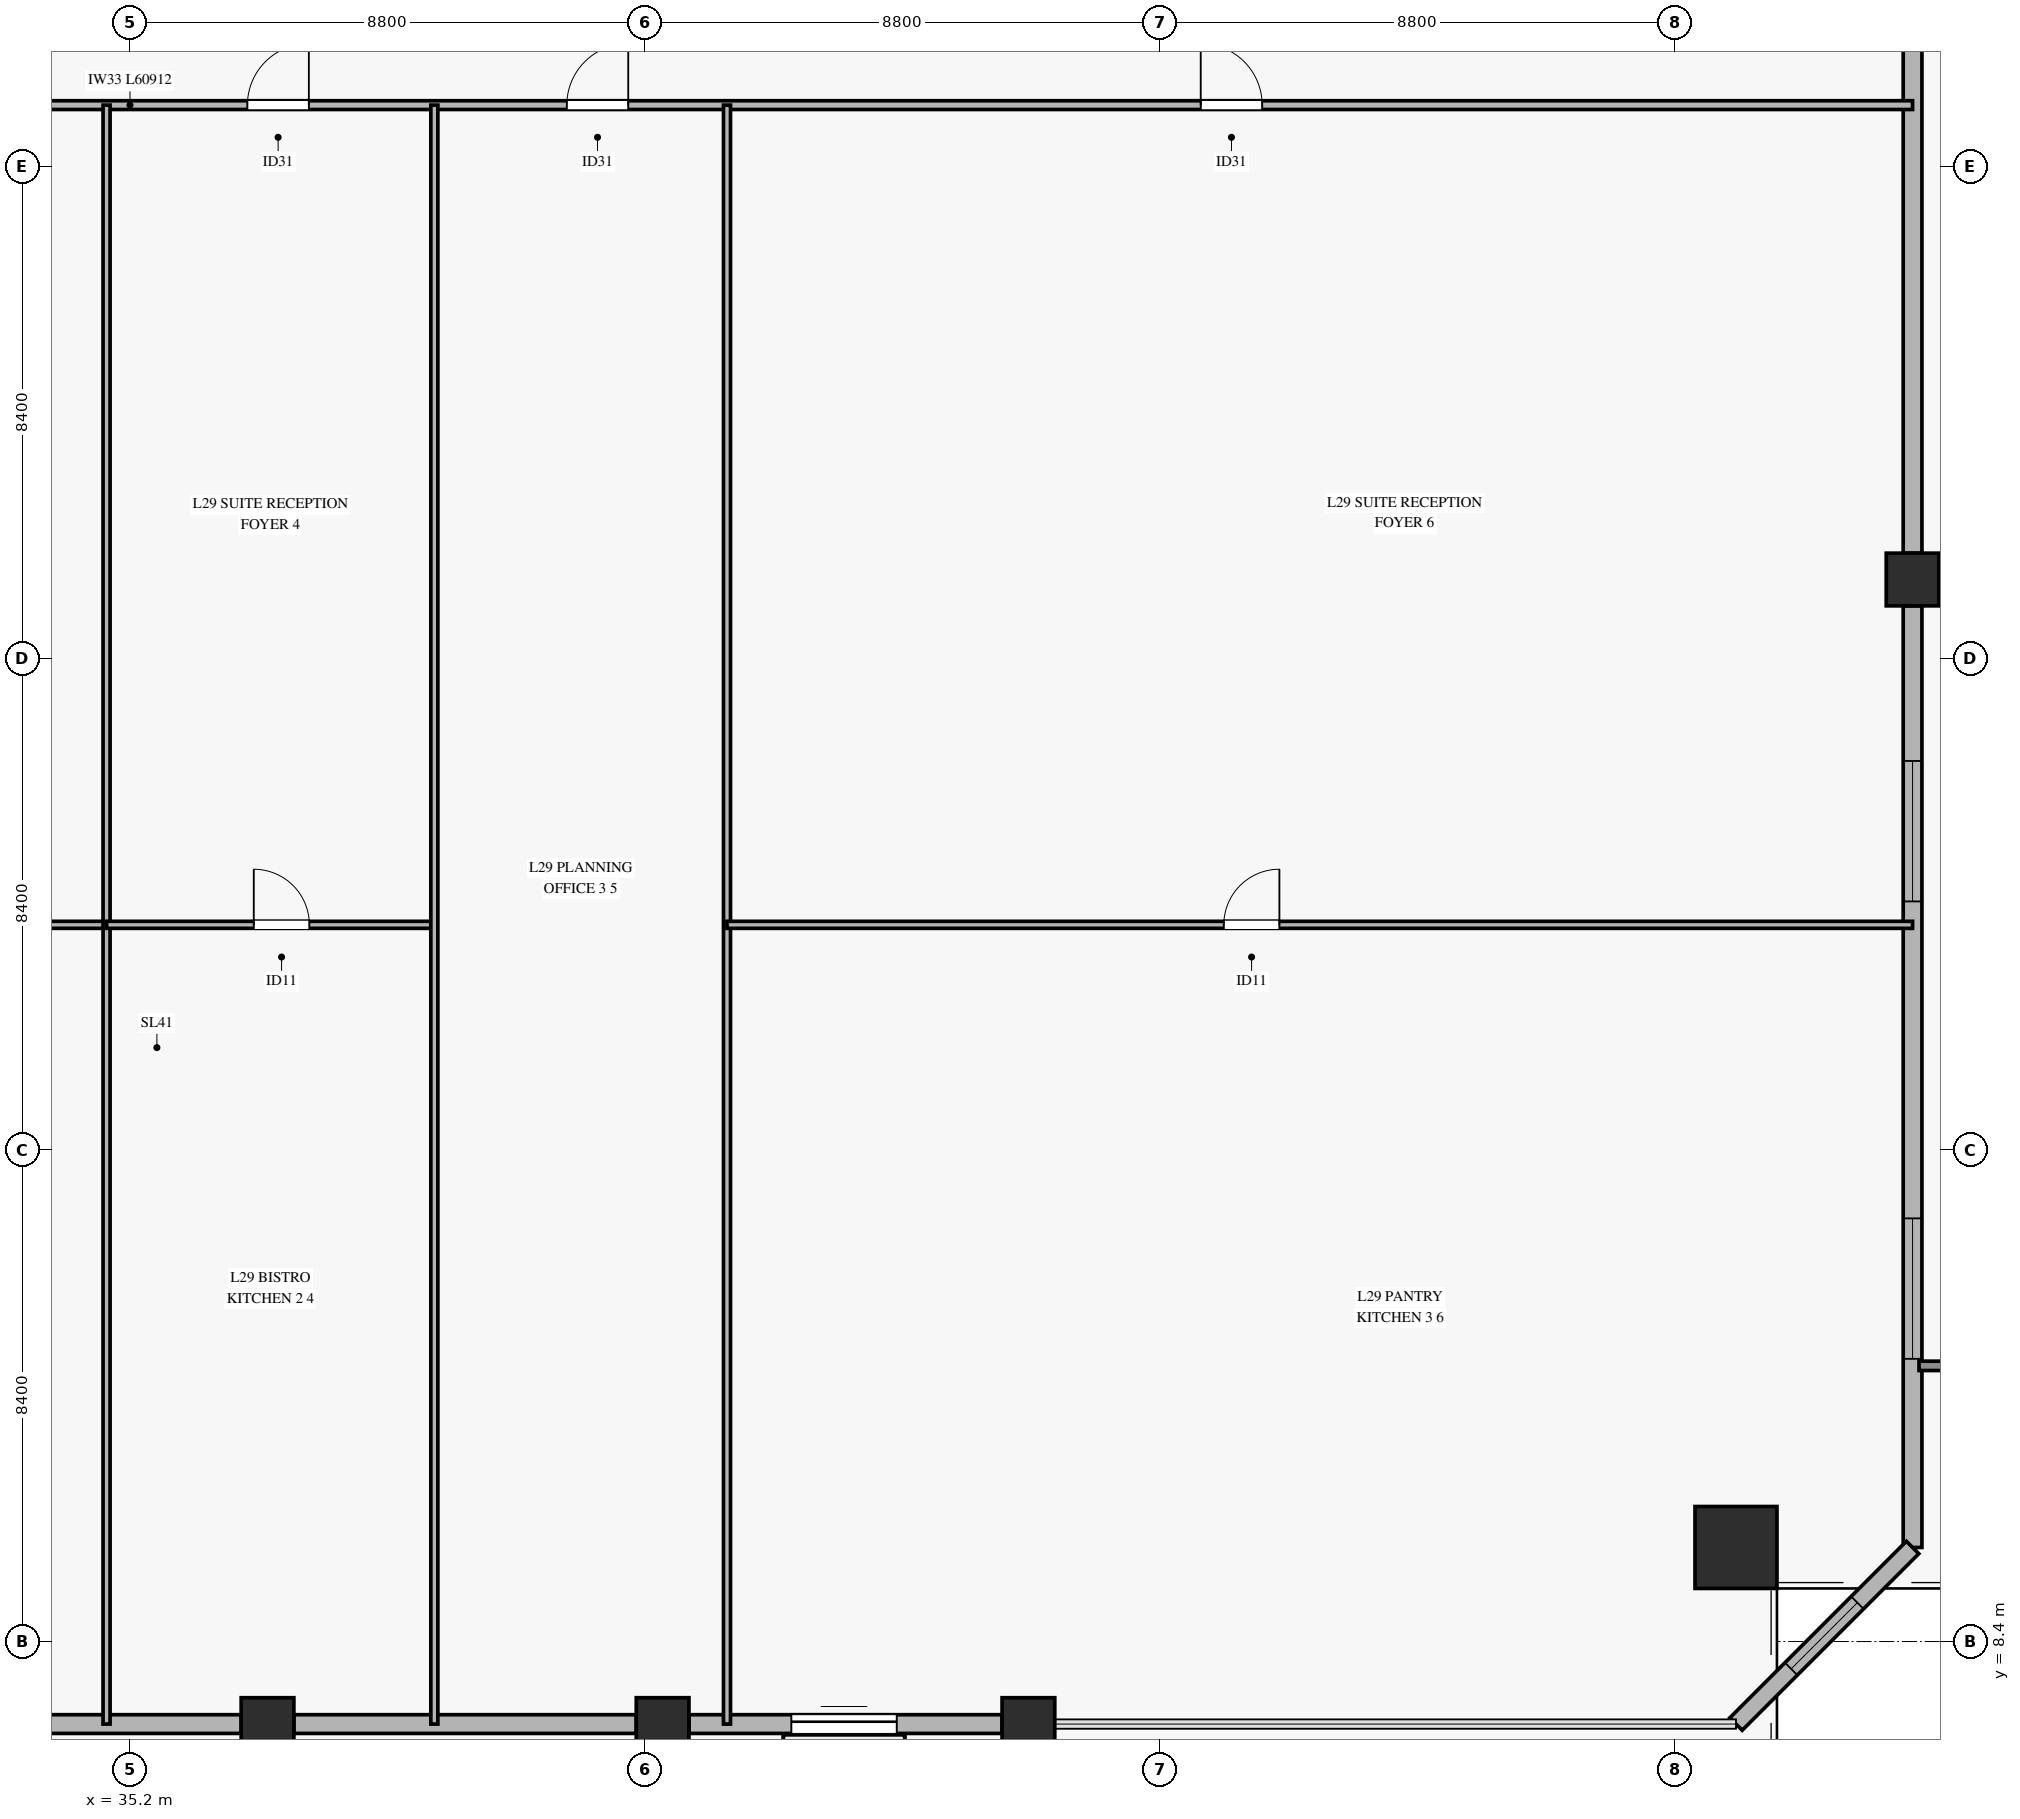
"""IFC4 building model, lengths in metres.
Left out: names, types, materials, properties, quantities, classifications, styles, units other than length and angle.
Written with IfcOpenShell. Run it as: python <this file> out.ifc"""

import sys

from ifc_helpers import new_model, si_unit, direction, frame, frame_2d, origin, origin_2d, place, context, subcontext, project, spatial, rectangle, hollow_rectangle, extrude, source, transform, mapped, element, fill, save


model = new_model("IFC4")
c1 = context("Model", 3, precision=1e-05, world=origin(), true_north=direction((0.0, 1.0)))
c2 = subcontext(c1, "Body", "Model", "MODEL_VIEW")
j1 = project(units=[si_unit("LENGTHUNIT", "METRE"), si_unit("PLANEANGLEUNIT", "RADIAN")], contexts=[c1])
p1 = place(None, origin())
s1 = spatial("IfcSite", under=j1, at=p1, CompositionType="ELEMENT")
p2 = place(p1, origin())
s2 = spatial("IfcBuilding", under=s1, at=p2, CompositionType="ELEMENT")
p3 = place(p2, frame((0.0, 0.0, 119.2)))
s3 = spatial("IfcBuildingStorey", under=s2, at=p3, CompositionType="ELEMENT", Elevation=119.2)
m1 = source(origin(), c2, "Body", "SweptSolid", [
    extrude(hollow_rectangle(XDim=1.4, YDim=1.4, WallThickness=0.065, at=origin_2d()), origin(), (0.0, 0.0, 1.0), 3.72),
])
p4 = place(p3, frame((62.639, 10.007, 0.0), z_axis=(-0.056180364921, 0.134937885839, 0.989260093991), x_axis=(-0.923183164535, -0.384360305857, 0.0)))
e1 = element("IfcColumn", 1, at=p4, inside=s3, PredefinedType="COLUMN", context=c2, shape_type="MappedRepresentation", body=[
    mapped(m1, transform((0.0, 0.0, 0.0), x_axis=(1.0, 0.0, 0.0), y_axis=(0.0, 1.0, 0.0), z_axis=(0.0, 0.0, 1.0), scale=1.0)),
])
m2 = source(origin(), c2, "Body", "SweptSolid", [
    extrude(hollow_rectangle(XDim=0.9, YDim=0.9, WallThickness=0.04, at=origin_2d()), origin(), (0.0, 0.0, 1.0), 3.718),
])
for number, where, z_axis, x_axis in (
    (2, (37.55, 6.99, 0.0), (0.0, 0.142, 0.99), (-1.0, 0.0, 0.0)),
    (3, (44.3, 6.99, 0.0), (0.0, 0.142, 0.99), (-1.0, 0.0, 0.0)),
    (4, (50.55, 6.99, 0.0), (0.0, 0.142, 0.99), (-1.0, 0.0, 0.0)),
):
    element("IfcColumn", number, at=place(p3, frame(where, z_axis=z_axis, x_axis=x_axis)), inside=s3, PredefinedType="COLUMN", context=c2, shape_type="MappedRepresentation", body=[
        mapped(m2, transform((0.0, 0.0, 0.0), x_axis=(1.0, 0.0, 0.0), y_axis=(0.0, 1.0, 0.0), z_axis=(0.0, 0.0, 1.0), scale=1.0)),
    ])
m3 = source(origin(), c2, "Body", "SweptSolid", [
    extrude(hollow_rectangle(XDim=0.9, YDim=0.9, WallThickness=0.04, at=origin_2d()), origin(), (0.0, 0.0, 1.0), 3.697),
])
p5 = place(p3, frame((65.656, 26.545, 0.0), z_axis=(-0.063596100828, 0.07145480903, 0.995414359062), x_axis=(-0.746990181356, -0.664835068989, 0.0)))
e5 = element("IfcColumn", 5, at=p5, inside=s3, PredefinedType="COLUMN", context=c2, shape_type="MappedRepresentation", body=[
    mapped(m3, transform((0.0, 0.0, 0.0), x_axis=(1.0, 0.0, 0.0), y_axis=(0.0, 1.0, 0.0), z_axis=(0.0, 0.0, 1.0), scale=1.0)),
])
for number, where, z_axis, x_axis in (
    (6, (31.25, 6.99, 0.0), (0.0, 0.0, 1.0), (1.0, 0.0, 0.0)),
    (7, (38.0, 6.99, 0.0), (0.0, 0.0, 1.0), (1.0, 0.0, 0.0)),
):
    element("IfcWall", number, at=place(p3, frame(where, z_axis=z_axis, x_axis=x_axis)), inside=s3, PredefinedType="SOLIDWALL", context=c2, shape_type="SweptSolid", body=[
        extrude(rectangle(XDim=5.85, YDim=0.32, at=frame_2d((2.925, 0.0))), origin(), (0.0, 0.0, 1.0), 3.16),
    ])
p6 = place(p3, frame((44.75, 6.99, 0.0), z_axis=(0.0, 0.0, 1.0), x_axis=(1.0, 0.0, 0.0)))
e8 = element("IfcWall", 8, at=p6, inside=s3, PredefinedType="SOLIDWALL", context=c2, shape_type="SweptSolid", body=[
    extrude(rectangle(XDim=5.35, YDim=0.32, at=frame_2d((2.675, 0.0))), origin(), (0.0, 0.0, 1.0), 3.16),
])
p7 = place(p6, frame((1.75, 0.0, 0.0)))
e9 = element("IfcOpeningElement", 9, at=p7, cuts=e8, PredefinedType="OPENING", context=c2, shape_type="SweptSolid", body=[
    extrude(rectangle(XDim=1.8, YDim=2.25, at=frame_2d((0.9, 1.125))), frame((0.0, 0.17, 0.0), z_axis=(0.0, -1.0, 0.0), x_axis=(1.0, 0.0, 0.0)), (0.0, 0.0, 1.0), 0.34),
])
p8 = place(p3, frame((65.656, 10.007, 0.0), z_axis=(0.0, 0.0, 1.0), x_axis=(0.0, 1.0, 0.0)))
e10 = element("IfcWall", 10, at=p8, inside=s3, PredefinedType="SOLIDWALL", context=c2, shape_type="SweptSolid", body=[
    extrude(rectangle(XDim=16.088, YDim=0.32, at=frame_2d((8.044, 0.0))), origin(), (0.0, 0.0, 1.0), 3.16),
])
p9 = place(p8, frame((3.223, 0.0, 0.45)))
e11 = element("IfcOpeningElement", 11, at=p9, cuts=e10, PredefinedType="OPENING", context=c2, shape_type="SweptSolid", body=[
    extrude(rectangle(XDim=2.4, YDim=2.1, at=frame_2d((1.2, 1.05))), frame((0.0, 0.17, 0.0), z_axis=(0.0, -1.0, 0.0), x_axis=(1.0, 0.0, 0.0)), (0.0, 0.0, 1.0), 0.34),
])
p10 = place(p8, frame((11.038, 0.0, 0.45)))
e12 = element("IfcOpeningElement", 12, at=p10, cuts=e10, PredefinedType="OPENING", context=c2, shape_type="SweptSolid", body=[
    extrude(rectangle(XDim=2.4, YDim=2.1, at=frame_2d((1.2, 1.05))), frame((0.0, 0.17, 0.0), z_axis=(0.0, -1.0, 0.0), x_axis=(1.0, 0.0, 0.0)), (0.0, 0.0, 1.0), 0.34),
])
p11 = place(p3, frame((65.656, 26.995, 0.0), z_axis=(0.0, 0.0, 1.0), x_axis=(0.0, 1.0, 0.0)))
e13 = element("IfcWall", 13, at=p11, inside=s3, PredefinedType="SOLIDWALL", context=c2, shape_type="SweptSolid", body=[
    extrude(rectangle(XDim=16.088, YDim=0.32, at=frame_2d((8.044, 0.0))), origin(), (0.0, 0.0, 1.0), 3.16),
])
p12 = place(p11, frame((10.86, 0.0, 0.45)))
e14 = element("IfcOpeningElement", 14, at=p12, cuts=e13, PredefinedType="OPENING", context=c2, shape_type="SweptSolid", body=[
    extrude(rectangle(XDim=2.4, YDim=2.1, at=frame_2d((1.2, 1.05))), frame((0.0, 0.17, 0.0), z_axis=(0.0, -1.0, 0.0), x_axis=(1.0, 0.0, 0.0)), (0.0, 0.0, 1.0), 0.34),
])
p13 = place(p3, frame((62.639, 6.99, 0.0), z_axis=(0.0, 0.0, 1.0), x_axis=(0.707106781187, 0.707106781187, 0.0)))
e15 = element("IfcWall", 15, at=p13, inside=s3, PredefinedType="SOLIDWALL", context=c2, shape_type="SweptSolid", body=[
    extrude(rectangle(XDim=4.267, YDim=0.3, at=frame_2d((2.133, 0.0))), origin(), (0.0, 0.0, 1.0), 3.16),
])
p14 = place(p13, frame((1.333, 0.0, 0.45)))
e16 = element("IfcOpeningElement", 16, at=p14, cuts=e15, PredefinedType="OPENING", context=c2, shape_type="SweptSolid", body=[
    extrude(rectangle(XDim=1.6, YDim=2.0, at=frame_2d((0.8, 1.0))), frame((0.0, 0.16, 0.0), z_axis=(0.0, -1.0, 0.0), x_axis=(1.0, 0.0, 0.0)), (0.0, 0.0, 1.0), 0.32),
])
p15 = place(p3, frame((4.744, 34.65, 0.0), z_axis=(0.0, 0.0, 1.0), x_axis=(1.0, 0.0, 0.0)))
e17 = element("IfcWall", 17, at=p15, inside=s3, PredefinedType="PARTITIONING", context=c2, shape_type="SweptSolid", body=[
    extrude(rectangle(XDim=60.912, YDim=0.15, at=frame_2d((30.456, 0.0))), origin(), (0.0, 0.0, 1.0), 2.765),
])
p16 = place(p15, frame((7.747, 0.0, 0.0)))
e18 = element("IfcOpeningElement", 18, at=p16, cuts=e17, PredefinedType="OPENING", context=c2, shape_type="SweptSolid", body=[
    extrude(rectangle(XDim=1.05, YDim=2.15, at=frame_2d((0.525, 1.075))), frame((0.0, 0.085, 0.0), z_axis=(0.0, -1.0, 0.0), x_axis=(1.0, 0.0, 0.0)), (0.0, 0.0, 1.0), 0.17),
])
p17 = place(p15, frame((20.391, 0.0, 0.0)))
e19 = element("IfcOpeningElement", 19, at=p17, cuts=e17, PredefinedType="OPENING", context=c2, shape_type="SweptSolid", body=[
    extrude(rectangle(XDim=1.05, YDim=2.15, at=frame_2d((0.525, 1.075))), frame((0.0, 0.085, 0.0), z_axis=(0.0, -1.0, 0.0), x_axis=(1.0, 0.0, 0.0)), (0.0, 0.0, 1.0), 0.17),
])
p18 = place(p15, frame((26.622, 0.0, 0.0)))
e20 = element("IfcOpeningElement", 20, at=p18, cuts=e17, PredefinedType="OPENING", context=c2, shape_type="SweptSolid", body=[
    extrude(rectangle(XDim=1.05, YDim=2.15, at=frame_2d((0.525, 1.075))), frame((0.0, 0.085, 0.0), z_axis=(0.0, -1.0, 0.0), x_axis=(1.0, 0.0, 0.0)), (0.0, 0.0, 1.0), 0.17),
])
p19 = place(p15, frame((32.462, 0.0, 0.0)))
e21 = element("IfcOpeningElement", 21, at=p19, cuts=e17, PredefinedType="OPENING", context=c2, shape_type="SweptSolid", body=[
    extrude(rectangle(XDim=1.05, YDim=2.15, at=frame_2d((0.525, 1.075))), frame((0.0, 0.085, 0.0), z_axis=(0.0, -1.0, 0.0), x_axis=(1.0, 0.0, 0.0)), (0.0, 0.0, 1.0), 0.17),
])
p20 = place(p15, frame((37.919, 0.0, 0.0)))
e22 = element("IfcOpeningElement", 22, at=p20, cuts=e17, PredefinedType="OPENING", context=c2, shape_type="SweptSolid", body=[
    extrude(rectangle(XDim=1.05, YDim=2.15, at=frame_2d((0.525, 1.075))), frame((0.0, 0.085, 0.0), z_axis=(0.0, -1.0, 0.0), x_axis=(1.0, 0.0, 0.0)), (0.0, 0.0, 1.0), 0.17),
])
p21 = place(p15, frame((48.75, 0.0, 0.0)))
e23 = element("IfcOpeningElement", 23, at=p21, cuts=e17, PredefinedType="OPENING", context=c2, shape_type="SweptSolid", body=[
    extrude(rectangle(XDim=1.05, YDim=2.15, at=frame_2d((0.525, 1.075))), frame((0.0, 0.085, 0.0), z_axis=(0.0, -1.0, 0.0), x_axis=(1.0, 0.0, 0.0)), (0.0, 0.0, 1.0), 0.17),
])
p22 = place(p3, frame((28.8, 20.645, 0.0), z_axis=(0.0, 0.0, 1.0), x_axis=(1.0, 0.0, 0.0)))
e24 = element("IfcWall", 24, at=p22, inside=s3, PredefinedType="PARTITIONING", context=c2, shape_type="SweptSolid", body=[
    extrude(rectangle(XDim=6.0, YDim=0.12, at=frame_2d((3.0, 0.0))), origin(), (0.0, 0.0, 1.0), 2.765),
])
p23 = place(p22, frame((2.683, 0.0, 0.0)))
e25 = element("IfcOpeningElement", 25, at=p23, cuts=e24, PredefinedType="OPENING", context=c2, shape_type="SweptSolid", body=[
    extrude(rectangle(XDim=0.95, YDim=2.1, at=frame_2d((0.475, 1.05))), frame((0.0, 0.07, 0.0), z_axis=(0.0, -1.0, 0.0), x_axis=(1.0, 0.0, 0.0)), (0.0, 0.0, 1.0), 0.14),
])
p24 = place(p3, frame((34.8, 6.99, 0.0), z_axis=(0.0, 0.0, 1.0), x_axis=(0.0, 1.0, 0.0)))
e26 = element("IfcWall", 26, at=p24, inside=s3, PredefinedType="PARTITIONING", context=c2, shape_type="SweptSolid", body=[
    extrude(rectangle(XDim=27.66, YDim=0.12, at=frame_2d((13.83, 0.0))), origin(), (0.0, 0.0, 1.0), 3.165),
])
p25 = place(p3, frame((34.8, 20.645, 0.0), z_axis=(0.0, 0.0, 1.0), x_axis=(1.0, 0.0, 0.0)))
e27 = element("IfcWall", 27, at=p25, inside=s3, PredefinedType="PARTITIONING", context=c2, shape_type="SweptSolid", body=[
    extrude(rectangle(XDim=5.6, YDim=0.12, at=frame_2d((2.8, 0.0))), origin(), (0.0, 0.0, 1.0), 2.765),
])
p26 = place(p25, frame((2.515, 0.0, 0.0)))
e28 = element("IfcOpeningElement", 28, at=p26, cuts=e27, PredefinedType="OPENING", context=c2, shape_type="SweptSolid", body=[
    extrude(rectangle(XDim=0.95, YDim=2.1, at=frame_2d((0.475, 1.05))), frame((0.0, 0.07, 0.0), z_axis=(0.0, -1.0, 0.0), x_axis=(1.0, 0.0, 0.0)), (0.0, 0.0, 1.0), 0.14),
])
for number, where, z_axis, x_axis in (
    (29, (40.4, 6.99, 0.0), (0.0, 0.0, 1.0), (0.0, 1.0, 0.0)),
    (30, (45.4, 6.99, 0.0), (0.0, 0.0, 1.0), (0.0, 1.0, 0.0)),
):
    element("IfcWall", number, at=place(p3, frame(where, z_axis=z_axis, x_axis=x_axis)), inside=s3, PredefinedType="PARTITIONING", context=c2, shape_type="SweptSolid", body=[
        extrude(rectangle(XDim=27.66, YDim=0.12, at=frame_2d((13.83, 0.0))), origin(), (0.0, 0.0, 1.0), 3.165),
    ])
p27 = place(p3, frame((45.4, 20.645, 0.0), z_axis=(0.0, 0.0, 1.0), x_axis=(1.0, 0.0, 0.0)))
e31 = element("IfcWall", 31, at=p27, inside=s3, PredefinedType="PARTITIONING", context=c2, shape_type="SweptSolid", body=[
    extrude(rectangle(XDim=20.256, YDim=0.12, at=frame_2d((10.128, 0.0))), origin(), (0.0, 0.0, 1.0), 2.765),
])
p28 = place(p27, frame((8.488, 0.0, 0.0)))
e32 = element("IfcOpeningElement", 32, at=p28, cuts=e31, PredefinedType="OPENING", context=c2, shape_type="SweptSolid", body=[
    extrude(rectangle(XDim=0.95, YDim=2.1, at=frame_2d((0.475, 1.05))), frame((0.0, 0.07, 0.0), z_axis=(0.0, -1.0, 0.0), x_axis=(1.0, 0.0, 0.0)), (0.0, 0.0, 1.0), 0.14),
])
m4 = source(origin(), c2, "Body", "SweptSolid", [
    extrude(rectangle(XDim=1.8, YDim=2.25, at=frame_2d((0.9, 1.125))), frame((0.0, 0.025, 0.0), z_axis=(0.0, -1.0, 0.0), x_axis=(1.0, 0.0, 0.0)), (0.0, 0.0, 1.0), 0.05),
])
p29 = place(p7, origin())
e33 = element("IfcDoor", 33, at=p29, inside=s3, OperationType="SLIDING_TO_LEFT", PredefinedType="DOOR", context=c2, shape_type="MappedRepresentation", body=[
    mapped(m4, transform((0.0, 0.0, 0.0), x_axis=(1.0, 0.0, 0.0), y_axis=(0.0, 1.0, 0.0), z_axis=(0.0, 0.0, 1.0), scale=1.0)),
])
fill(e9, e33)
m5 = source(origin(), c2, "Body", "SweptSolid", [
    extrude(rectangle(XDim=2.4, YDim=2.1, at=frame_2d((1.2, 1.05))), frame((0.0, 0.03, 0.0), z_axis=(0.0, -1.0, 0.0), x_axis=(1.0, 0.0, 0.0)), (0.0, 0.0, 1.0), 0.06),
])
p30 = place(p9, origin())
e34 = element("IfcWindow", 34, at=p30, inside=s3, PartitioningType="SINGLE_PANEL", PredefinedType="WINDOW", context=c2, shape_type="MappedRepresentation", body=[
    mapped(m5, transform((0.0, 0.0, 0.0), x_axis=(1.0, 0.0, 0.0), y_axis=(0.0, 1.0, 0.0), z_axis=(0.0, 0.0, 1.0), scale=1.0)),
])
fill(e11, e34)
p31 = place(p10, origin())
e35 = element("IfcWindow", 35, at=p31, inside=s3, PartitioningType="SINGLE_PANEL", PredefinedType="WINDOW", context=c2, shape_type="MappedRepresentation", body=[
    mapped(m5, transform((0.0, 0.0, 0.0), x_axis=(1.0, 0.0, 0.0), y_axis=(0.0, 1.0, 0.0), z_axis=(0.0, 0.0, 1.0), scale=1.0)),
])
fill(e12, e35)
m6 = source(origin(), c2, "Body", "SweptSolid", [
    extrude(rectangle(XDim=1.6, YDim=2.0, at=frame_2d((0.8, 1.0))), frame((0.0, 0.03, 0.0), z_axis=(0.0, -1.0, 0.0), x_axis=(1.0, 0.0, 0.0)), (0.0, 0.0, 1.0), 0.06),
])
p32 = place(p14, origin())
e36 = element("IfcWindow", 36, at=p32, inside=s3, PartitioningType="SINGLE_PANEL", PredefinedType="WINDOW", context=c2, shape_type="MappedRepresentation", body=[
    mapped(m6, transform((0.0, 0.0, 0.0), x_axis=(1.0, 0.0, 0.0), y_axis=(0.0, 1.0, 0.0), z_axis=(0.0, 0.0, 1.0), scale=1.0)),
])
fill(e16, e36)
m7 = source(origin(), c2, "Body", "SweptSolid", [
    extrude(rectangle(XDim=1.05, YDim=2.15, at=frame_2d((0.525, 1.075))), frame((0.0, 0.025, 0.0), z_axis=(0.0, -1.0, 0.0), x_axis=(1.0, 0.0, 0.0)), (0.0, 0.0, 1.0), 0.05),
])
p33 = place(p19, origin())
e37 = element("IfcDoor", 37, at=p33, inside=s3, OperationType="SINGLE_SWING_RIGHT", PredefinedType="DOOR", context=c2, shape_type="MappedRepresentation", body=[
    mapped(m7, transform((0.0, 0.0, 0.0), x_axis=(1.0, 0.0, 0.0), y_axis=(0.0, 1.0, 0.0), z_axis=(0.0, 0.0, 1.0), scale=1.0)),
])
fill(e21, e37)
m8 = source(origin(), c2, "Body", "SweptSolid", [
    extrude(rectangle(XDim=0.95, YDim=2.1, at=frame_2d((0.475, 1.05))), frame((0.0, 0.025, 0.0), z_axis=(0.0, -1.0, 0.0), x_axis=(1.0, 0.0, 0.0)), (0.0, 0.0, 1.0), 0.05),
])
p34 = place(p26, origin())
e38 = element("IfcDoor", 38, at=p34, inside=s3, OperationType="SINGLE_SWING_LEFT", PredefinedType="DOOR", context=c2, shape_type="MappedRepresentation", body=[
    mapped(m8, transform((0.0, 0.0, 0.0), x_axis=(1.0, 0.0, 0.0), y_axis=(0.0, 1.0, 0.0), z_axis=(0.0, 0.0, 1.0), scale=1.0)),
])
fill(e28, e38)
p35 = place(p20, origin())
e39 = element("IfcDoor", 39, at=p35, inside=s3, OperationType="SINGLE_SWING_RIGHT", PredefinedType="DOOR", context=c2, shape_type="MappedRepresentation", body=[
    mapped(m7, transform((0.0, 0.0, 0.0), x_axis=(1.0, 0.0, 0.0), y_axis=(0.0, 1.0, 0.0), z_axis=(0.0, 0.0, 1.0), scale=1.0)),
])
fill(e22, e39)
p36 = place(p21, origin())
e40 = element("IfcDoor", 40, at=p36, inside=s3, OperationType="SINGLE_SWING_LEFT", PredefinedType="DOOR", context=c2, shape_type="MappedRepresentation", body=[
    mapped(m7, transform((0.0, 0.0, 0.0), x_axis=(1.0, 0.0, 0.0), y_axis=(0.0, 1.0, 0.0), z_axis=(0.0, 0.0, 1.0), scale=1.0)),
])
fill(e23, e40)
p37 = place(p28, origin())
e41 = element("IfcDoor", 41, at=p37, inside=s3, OperationType="SINGLE_SWING_RIGHT", PredefinedType="DOOR", context=c2, shape_type="MappedRepresentation", body=[
    mapped(m8, transform((0.0, 0.0, 0.0), x_axis=(1.0, 0.0, 0.0), y_axis=(0.0, 1.0, 0.0), z_axis=(0.0, 0.0, 1.0), scale=1.0)),
])
fill(e32, e41)
save(model, sys.argv[1])
